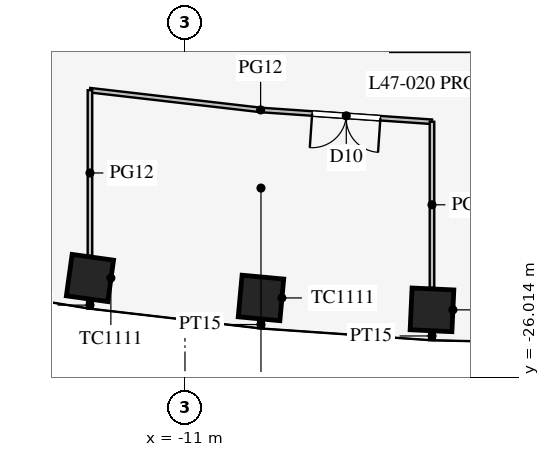
"""IFC4 building model, lengths in metres.
Left out: names, types, materials, properties, quantities, classifications, styles, units other than length and angle.
Written with IfcOpenShell. Run it as: python <this file> out.ifc"""

import sys

from ifc_helpers import new_model, si_unit, direction, frame, frame_2d, origin, origin_2d, place, context, subcontext, project, spatial, rectangle, extrude, element, fill, save


model = new_model("IFC4")
c1 = context("Model", 3, precision=1e-05, world=origin(), true_north=direction((0.0, 1.0)))
c2 = subcontext(c1, "Body", "Model", "MODEL_VIEW")
j1 = project(units=[si_unit("LENGTHUNIT", "METRE"), si_unit("PLANEANGLEUNIT", "RADIAN")], contexts=[c1])
p1 = place(None, origin())
s1 = spatial("IfcSite", under=j1, at=p1, CompositionType="ELEMENT")
p2 = place(p1, origin())
s2 = spatial("IfcBuilding", under=s1, at=p2, CompositionType="ELEMENT")
p3 = place(p2, frame((0.0, 0.0, 206.5)))
s3 = spatial("IfcBuildingStorey", under=s2, at=p3, CompositionType="ELEMENT", Elevation=206.5)
for number, where, z_axis, x_axis in (
    (1, (-13.5, -23.408, 0.0), (0.0, 0.0, 1.0), (0.99, -0.138, 0.0)),
    (2, (-9.0, -23.933, 0.0), (0.0, 0.0, 1.0), (0.996, -0.092, 0.0)),
    (3, (-4.5, -24.246, 0.0), (0.0, 0.0, 1.0), (0.999, -0.046, 0.0)),
):
    element("IfcColumn", number, at=place(p3, frame(where, z_axis=z_axis, x_axis=x_axis)), inside=s3, PredefinedType="COLUMN", context=c2, shape_type="SweptSolid", body=[
        extrude(rectangle(XDim=1.1, YDim=1.1, at=origin_2d()), origin(), (0.0, 0.0, 1.0), 4.2),
    ])
p4 = place(p3, frame((-13.5, -24.033, 0.0), z_axis=(0.0, 0.0, 1.0), x_axis=(0.0, -1.0, 0.0)))
e4 = element("IfcWall", 4, at=p4, inside=s3, PredefinedType="PARTITIONING", context=c2, shape_type="SweptSolid", body=[
    extrude(rectangle(XDim=0.178, YDim=0.15, at=frame_2d((0.089, 0.0))), origin(), (0.0, 0.0, 1.0), 2.9),
])
p5 = place(p3, frame((-4.5, -24.825, 0.0), z_axis=(0.0, 0.0, 1.0), x_axis=(0.0, -1.0, 0.0)))
e5 = element("IfcWall", 5, at=p5, inside=s3, PredefinedType="PARTITIONING", context=c2, shape_type="SweptSolid", body=[
    extrude(rectangle(XDim=0.217, YDim=0.15, at=frame_2d((0.108, 0.0))), origin(), (0.0, 0.0, 1.0), 2.9),
])
p6 = place(p3, frame((-9.0, -24.535, 0.0), z_axis=(0.0, 0.0, 1.0), x_axis=(0.0, -1.0, 0.0)))
e6 = element("IfcWall", 6, at=p6, inside=s3, PredefinedType="PARTITIONING", context=c2, shape_type="SweptSolid", body=[
    extrude(rectangle(XDim=0.196, YDim=0.15, at=frame_2d((0.098, 0.0))), origin(), (0.0, 0.0, 1.0), 2.9),
])
p7 = place(p3, frame((-13.5, -18.466, 0.0), z_axis=(0.0, 0.0, 1.0), x_axis=(0.993382946625, -0.114849124309, 0.0)))
e7 = element("IfcWall", 7, at=p7, inside=s3, PredefinedType="PARTITIONING", context=c2, shape_type="SweptSolid", body=[
    extrude(rectangle(XDim=4.53, YDim=0.12, at=frame_2d((2.265, 0.0))), origin(), (0.0, 0.0, 1.0), 2.9),
])
p8 = place(p3, frame((-9.0, -18.986, 0.0), z_axis=(0.0, 0.0, 1.0), x_axis=(0.997623533978, -0.068900540297, 0.0)))
e8 = element("IfcWall", 8, at=p8, inside=s3, PredefinedType="PARTITIONING", context=c2, shape_type="SweptSolid", body=[
    extrude(rectangle(XDim=4.511, YDim=0.12, at=frame_2d((2.255, 0.0))), origin(), (0.0, 0.0, 1.0), 2.9),
])
p9 = place(p8, frame((1.35, 0.0, 0.15)))
e9 = element("IfcOpeningElement", 9, at=p9, cuts=e8, PredefinedType="OPENING", context=c2, shape_type="SweptSolid", body=[
    extrude(rectangle(XDim=1.8, YDim=2.1, at=frame_2d((0.9, 1.05))), frame((0.0, 0.07, 0.0), z_axis=(0.0, -1.0, 0.0), x_axis=(1.0, 0.0, 0.0)), (0.0, 0.0, 1.0), 0.14),
])
p10 = place(p3, frame((-13.5, -18.466, 0.0), z_axis=(0.0, 0.0, 1.0), x_axis=(0.0, -1.0, 0.0)))
e10 = element("IfcWall", 10, at=p10, inside=s3, PredefinedType="PARTITIONING", context=c2, shape_type="SweptSolid", body=[
    extrude(rectangle(XDim=4.357, YDim=0.12, at=frame_2d((2.178, 0.0))), origin(), (0.0, 0.0, 1.0), 2.9),
])
p11 = place(p3, frame((-4.5, -19.297, 0.0), z_axis=(0.0, 0.0, 1.0), x_axis=(0.0, -1.0, 0.0)))
e11 = element("IfcWall", 11, at=p11, inside=s3, PredefinedType="PARTITIONING", context=c2, shape_type="SweptSolid", body=[
    extrude(rectangle(XDim=4.369, YDim=0.12, at=frame_2d((2.184, 0.0))), origin(), (0.0, 0.0, 1.0), 2.9),
])
p12 = place(p9, frame((1.8, 0.0, 0.0), z_axis=(0.0, 0.0, 1.0), x_axis=(-1.0, 0.0, 0.0)))
e12 = element("IfcDoor", 12, at=p12, inside=s3, OperationType="DOUBLE_DOOR_SINGLE_SWING", PredefinedType="DOOR", context=c2, shape_type="SweptSolid", body=[
    extrude(rectangle(XDim=1.8, YDim=2.1, at=frame_2d((0.9, 1.05))), frame((0.0, 0.025, 0.0), z_axis=(0.0, -1.0, 0.0), x_axis=(1.0, 0.0, 0.0)), (0.0, 0.0, 1.0), 0.05),
])
fill(e9, e12)
save(model, sys.argv[1])
